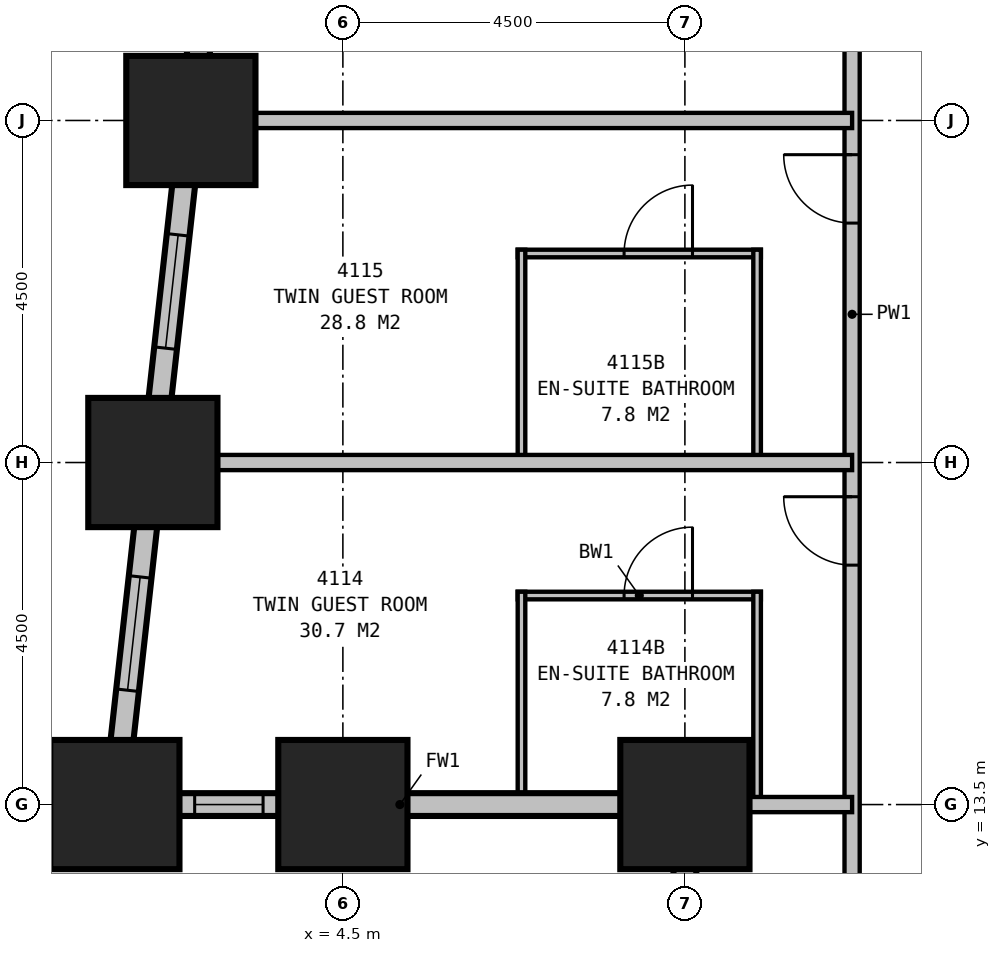
"""IFC4 building model, lengths in metres.
Left out: names, types, materials, properties, quantities, classifications, styles, units other than length and angle.
Written with IfcOpenShell. Run it as: python <this file> out.ifc"""

import sys

from ifc_helpers import new_model, si_unit, direction, frame, frame_2d, origin, origin_2d, place, context, subcontext, project, spatial, rectangle, extrude, element, fill, save


model = new_model("IFC4")
c1 = context("Model", 3, precision=1e-05, world=origin(), true_north=direction((0.0, 1.0)))
c2 = subcontext(c1, "Body", "Model", "MODEL_VIEW")
j1 = project(units=[si_unit("LENGTHUNIT", "METRE"), si_unit("PLANEANGLEUNIT", "RADIAN")], contexts=[c1])
p1 = place(None, origin())
s1 = spatial("IfcSite", under=j1, at=p1, CompositionType="ELEMENT")
p2 = place(p1, origin())
s2 = spatial("IfcBuilding", under=s1, at=p2, CompositionType="ELEMENT")
p3 = place(p2, frame((0.0, 0.0, 162.4)))
s3 = spatial("IfcBuildingStorey", under=s2, at=p3, CompositionType="ELEMENT", Elevation=162.4)
for number, where, z_axis, x_axis in (
    (1, (1.5, 13.5, 0.0), (0.0, 0.0, 1.0), (1.0, 0.0, 0.0)),
    (2, (4.5, 13.5, 0.0), (0.0, 0.0, 1.0), (1.0, 0.0, 0.0)),
    (3, (9.0, 13.5, 0.0), (0.0, 0.0, 1.0), (1.0, 0.0, 0.0)),
    (4, (2.5, 22.5, 0.0), (0.0, 0.0, 1.0), (1.0, 0.0, 0.0)),
    (5, (2.0, 18.0, 0.0), (0.0, 0.0, 1.0), (1.0, 0.0, 0.0)),
):
    element("IfcColumn", number, at=place(p3, frame(where, z_axis=z_axis, x_axis=x_axis)), inside=s3, PredefinedType="COLUMN", context=c2, shape_type="SweptSolid", body=[
        extrude(rectangle(XDim=1.7, YDim=1.7, at=origin_2d()), origin(), (0.0, 0.0, 1.0), 3.5),
    ])
p4 = place(p3, frame((1.35, 13.5, 0.0), z_axis=(0.0, 0.0, 1.0), x_axis=(1.0, 0.0, 0.0)))
e6 = element("IfcWall", 6, at=p4, inside=s3, PredefinedType="STANDARD", context=c2, shape_type="SweptSolid", body=[
    extrude(rectangle(XDim=7.8, YDim=0.3, at=frame_2d((3.9, 0.0))), origin(), (0.0, 0.0, 1.0), 2.0),
])
p5 = place(p4, frame((1.2, 0.0, 0.5)))
e7 = element("IfcOpeningElement", 7, at=p5, cuts=e6, PredefinedType="OPENING", context=c2, shape_type="SweptSolid", body=[
    extrude(rectangle(XDim=0.9, YDim=1.35, at=frame_2d((0.45, 0.675))), frame((0.0, 0.16, 0.0), z_axis=(0.0, -1.0, 0.0), x_axis=(1.0, 0.0, 0.0)), (0.0, 0.0, 1.0), 0.32),
])
p6 = place(p3, frame((9.0, 13.65, 0.0), z_axis=(0.0, 0.0, 1.0), x_axis=(0.0, -1.0, 0.0)))
e8 = element("IfcWall", 8, at=p6, inside=s3, PredefinedType="STANDARD", context=c2, shape_type="SweptSolid", body=[
    extrude(rectangle(XDim=13.8, YDim=0.3, at=frame_2d((6.9, 0.0))), origin(), (0.0, 0.0, 1.0), 2.0),
])
p7 = place(p6, frame((1.2, 0.0, 0.5)))
e9 = element("IfcOpeningElement", 9, at=p7, cuts=e8, PredefinedType="OPENING", context=c2, shape_type="SweptSolid", body=[
    extrude(rectangle(XDim=2.4, YDim=1.35, at=frame_2d((1.2, 0.675))), frame((0.0, 0.16, 0.0), z_axis=(0.0, -1.0, 0.0), x_axis=(1.0, 0.0, 0.0)), (0.0, 0.0, 1.0), 0.32),
])
p8 = place(p6, frame((5.7, 0.0, 0.5)))
e10 = element("IfcOpeningElement", 10, at=p8, cuts=e8, PredefinedType="OPENING", context=c2, shape_type="SweptSolid", body=[
    extrude(rectangle(XDim=2.4, YDim=1.35, at=frame_2d((1.2, 0.675))), frame((0.0, 0.16, 0.0), z_axis=(0.0, -1.0, 0.0), x_axis=(1.0, 0.0, 0.0)), (0.0, 0.0, 1.0), 0.32),
])
p9 = place(p6, frame((10.2, 0.0, 0.5)))
e11 = element("IfcOpeningElement", 11, at=p9, cuts=e8, PredefinedType="OPENING", context=c2, shape_type="SweptSolid", body=[
    extrude(rectangle(XDim=2.4, YDim=1.35, at=frame_2d((1.2, 0.675))), frame((0.0, 0.16, 0.0), z_axis=(0.0, -1.0, 0.0), x_axis=(1.0, 0.0, 0.0)), (0.0, 0.0, 1.0), 0.32),
])
p10 = place(p3, frame((4.017, 36.149, 0.0), z_axis=(0.0, 0.0, 1.0), x_axis=(-0.110433862387, -0.993883475081, 0.0)))
e12 = element("IfcWall", 12, at=p10, inside=s3, PredefinedType="STANDARD", context=c2, shape_type="SweptSolid", body=[
    extrude(rectangle(XDim=22.939, YDim=0.3, at=frame_2d((11.469, 0.0))), origin(), (0.0, 0.0, 1.0), 2.25),
])
p11 = place(p10, frame((1.664, 0.0, 0.5)))
e13 = element("IfcOpeningElement", 13, at=p11, cuts=e12, PredefinedType="OPENING", context=c2, shape_type="SweptSolid", body=[
    extrude(rectangle(XDim=1.5, YDim=1.6, at=frame_2d((0.75, 0.8))), frame((0.0, 0.16, 0.0), z_axis=(0.0, -1.0, 0.0), x_axis=(1.0, 0.0, 0.0)), (0.0, 0.0, 1.0), 0.32),
])
p12 = place(p10, frame((6.192, 0.0, 0.5)))
e14 = element("IfcOpeningElement", 14, at=p12, cuts=e12, PredefinedType="OPENING", context=c2, shape_type="SweptSolid", body=[
    extrude(rectangle(XDim=1.5, YDim=1.6, at=frame_2d((0.75, 0.8))), frame((0.0, 0.16, 0.0), z_axis=(0.0, -1.0, 0.0), x_axis=(1.0, 0.0, 0.0)), (0.0, 0.0, 1.0), 0.32),
])
p13 = place(p10, frame((10.719, 0.0, 0.5)))
e15 = element("IfcOpeningElement", 15, at=p13, cuts=e12, PredefinedType="OPENING", context=c2, shape_type="SweptSolid", body=[
    extrude(rectangle(XDim=1.5, YDim=1.6, at=frame_2d((0.75, 0.8))), frame((0.0, 0.16, 0.0), z_axis=(0.0, -1.0, 0.0), x_axis=(1.0, 0.0, 0.0)), (0.0, 0.0, 1.0), 0.32),
])
p14 = place(p10, frame((15.247, 0.0, 0.5)))
e16 = element("IfcOpeningElement", 16, at=p14, cuts=e12, PredefinedType="OPENING", context=c2, shape_type="SweptSolid", body=[
    extrude(rectangle(XDim=1.5, YDim=1.6, at=frame_2d((0.75, 0.8))), frame((0.0, 0.16, 0.0), z_axis=(0.0, -1.0, 0.0), x_axis=(1.0, 0.0, 0.0)), (0.0, 0.0, 1.0), 0.32),
])
p15 = place(p10, frame((19.775, 0.0, 0.5)))
e17 = element("IfcOpeningElement", 17, at=p15, cuts=e12, PredefinedType="OPENING", context=c2, shape_type="SweptSolid", body=[
    extrude(rectangle(XDim=1.5, YDim=1.6, at=frame_2d((0.75, 0.8))), frame((0.0, 0.16, 0.0), z_axis=(0.0, -1.0, 0.0), x_axis=(1.0, 0.0, 0.0)), (0.0, 0.0, 1.0), 0.32),
])
p16 = place(p3, frame((11.2, 10.6, 0.0), z_axis=(0.0, 0.0, 1.0), x_axis=(0.0, 1.0, 0.0)))
e18 = element("IfcWall", 18, at=p16, inside=s3, PredefinedType="PARTITIONING", context=c2, shape_type="SweptSolid", body=[
    extrude(rectangle(XDim=18.7, YDim=0.2, at=frame_2d((9.35, 0.0))), origin(), (0.0, 0.0, 1.0), 3.25),
])
p17 = place(p16, frame((6.05, 0.0, 0.0)))
e19 = element("IfcOpeningElement", 19, at=p17, cuts=e18, PredefinedType="OPENING", context=c2, shape_type="SweptSolid", body=[
    extrude(rectangle(XDim=0.9, YDim=2.1, at=frame_2d((0.45, 1.05))), frame((0.0, 0.11, 0.0), z_axis=(0.0, -1.0, 0.0), x_axis=(1.0, 0.0, 0.0)), (0.0, 0.0, 1.0), 0.22),
])
p18 = place(p16, frame((10.55, 0.0, 0.0)))
e20 = element("IfcOpeningElement", 20, at=p18, cuts=e18, PredefinedType="OPENING", context=c2, shape_type="SweptSolid", body=[
    extrude(rectangle(XDim=0.9, YDim=2.1, at=frame_2d((0.45, 1.05))), frame((0.0, 0.11, 0.0), z_axis=(0.0, -1.0, 0.0), x_axis=(1.0, 0.0, 0.0)), (0.0, 0.0, 1.0), 0.22),
])
p19 = place(p16, frame((14.65, 0.0, 0.0)))
e21 = element("IfcOpeningElement", 21, at=p19, cuts=e18, PredefinedType="OPENING", context=c2, shape_type="SweptSolid", body=[
    extrude(rectangle(XDim=1.0, YDim=2.1, at=frame_2d((0.5, 1.05))), frame((0.0, 0.11, 0.0), z_axis=(0.0, -1.0, 0.0), x_axis=(1.0, 0.0, 0.0)), (0.0, 0.0, 1.0), 0.22),
])
p20 = place(p3, frame((11.2, 18.0, 0.0), z_axis=(0.0, 0.0, 1.0), x_axis=(-1.0, 0.0, 0.0)))
e22 = element("IfcWall", 22, at=p20, inside=s3, PredefinedType="PARTITIONING", context=c2, shape_type="SweptSolid", body=[
    extrude(rectangle(XDim=9.199, YDim=0.2, at=frame_2d((4.6, 0.0))), origin(), (0.0, 0.0, 1.0), 2.25),
])
p21 = place(p3, frame((11.2, 22.5, 0.0), z_axis=(0.0, 0.0, 1.0), x_axis=(-1.0, 0.0, 0.0)))
e23 = element("IfcWall", 23, at=p21, inside=s3, PredefinedType="PARTITIONING", context=c2, shape_type="SweptSolid", body=[
    extrude(rectangle(XDim=8.699, YDim=0.2, at=frame_2d((4.35, 0.0))), origin(), (0.0, 0.0, 1.0), 2.25),
])
for number, where, z_axis, x_axis in (
    (24, (9.95, 13.5, 0.0), (0.0, 0.0, 1.0), (0.0, 1.0, 0.0)),
    (25, (6.85, 13.5, 0.0), (0.0, 0.0, 1.0), (0.0, 1.0, 0.0)),
):
    element("IfcWall", number, at=place(p3, frame(where, z_axis=z_axis, x_axis=x_axis)), inside=s3, PredefinedType="PLUMBINGWALL", context=c2, shape_type="SweptSolid", body=[
        extrude(rectangle(XDim=2.8, YDim=0.1, at=frame_2d((1.4, 0.0))), origin(), (0.0, 0.0, 1.0), 3.25),
    ])
p22 = place(p3, frame((10.0, 16.25, 0.0), z_axis=(0.0, 0.0, 1.0), x_axis=(-1.0, 0.0, 0.0)))
e26 = element("IfcWall", 26, at=p22, inside=s3, PredefinedType="PLUMBINGWALL", context=c2, shape_type="SweptSolid", body=[
    extrude(rectangle(XDim=3.2, YDim=0.1, at=frame_2d((1.6, 0.0))), origin(), (0.0, 0.0, 1.0), 3.25),
])
p23 = place(p22, frame((1.8, 0.0, 0.0), z_axis=(0.0, 0.0, 1.0), x_axis=(-1.0, 0.0, 0.0)))
e27 = element("IfcOpeningElement", 27, at=p23, cuts=e26, PredefinedType="OPENING", context=c2, shape_type="SweptSolid", body=[
    extrude(rectangle(XDim=0.9, YDim=2.1, at=frame_2d((0.45, 1.05))), frame((0.0, 0.06, 0.0), z_axis=(0.0, -1.0, 0.0), x_axis=(1.0, 0.0, 0.0)), (0.0, 0.0, 1.0), 0.12),
])
for number, where, z_axis, x_axis in (
    (28, (9.95, 18.0, 0.0), (0.0, 0.0, 1.0), (0.0, 1.0, 0.0)),
    (29, (6.85, 18.0, 0.0), (0.0, 0.0, 1.0), (0.0, 1.0, 0.0)),
):
    element("IfcWall", number, at=place(p3, frame(where, z_axis=z_axis, x_axis=x_axis)), inside=s3, PredefinedType="PLUMBINGWALL", context=c2, shape_type="SweptSolid", body=[
        extrude(rectangle(XDim=2.8, YDim=0.1, at=frame_2d((1.4, 0.0))), origin(), (0.0, 0.0, 1.0), 3.25),
    ])
p24 = place(p3, frame((10.0, 20.75, 0.0), z_axis=(0.0, 0.0, 1.0), x_axis=(-1.0, 0.0, 0.0)))
e30 = element("IfcWall", 30, at=p24, inside=s3, PredefinedType="PLUMBINGWALL", context=c2, shape_type="SweptSolid", body=[
    extrude(rectangle(XDim=3.2, YDim=0.1, at=frame_2d((1.6, 0.0))), origin(), (0.0, 0.0, 1.0), 3.25),
])
p25 = place(p24, frame((1.8, 0.0, 0.0), z_axis=(0.0, 0.0, 1.0), x_axis=(-1.0, 0.0, 0.0)))
e31 = element("IfcOpeningElement", 31, at=p25, cuts=e30, PredefinedType="OPENING", context=c2, shape_type="SweptSolid", body=[
    extrude(rectangle(XDim=0.9, YDim=2.1, at=frame_2d((0.45, 1.05))), frame((0.0, 0.06, 0.0), z_axis=(0.0, -1.0, 0.0), x_axis=(1.0, 0.0, 0.0)), (0.0, 0.0, 1.0), 0.12),
])
p26 = place(p3, frame((11.2, 13.5, 0.0), z_axis=(0.0, 0.0, 1.0), x_axis=(-1.0, 0.0, 0.0)))
e32 = element("IfcWall", 32, at=p26, inside=s3, PredefinedType="PARTITIONING", context=c2, shape_type="SweptSolid", body=[
    extrude(rectangle(XDim=2.2, YDim=0.2, at=frame_2d((1.1, 0.0))), origin(), (0.0, 0.0, 1.0), 1.95),
])
p27 = place(p5, origin())
e33 = element("IfcWindow", 33, at=p27, inside=s3, PartitioningType="SINGLE_PANEL", PredefinedType="WINDOW", context=c2, shape_type="SweptSolid", body=[
    extrude(rectangle(XDim=0.9, YDim=1.35, at=frame_2d((0.45, 0.675))), frame((0.0, 0.03, 0.0), z_axis=(0.0, -1.0, 0.0), x_axis=(1.0, 0.0, 0.0)), (0.0, 0.0, 1.0), 0.06),
])
fill(e7, e33)
p28 = place(p14, origin())
e34 = element("IfcWindow", 34, at=p28, inside=s3, PartitioningType="SINGLE_PANEL", PredefinedType="WINDOW", context=c2, shape_type="SweptSolid", body=[
    extrude(rectangle(XDim=1.5, YDim=1.6, at=frame_2d((0.75, 0.8))), frame((0.0, 0.03, 0.0), z_axis=(0.0, -1.0, 0.0), x_axis=(1.0, 0.0, 0.0)), (0.0, 0.0, 1.0), 0.06),
])
fill(e16, e34)
p29 = place(p15, origin())
e35 = element("IfcWindow", 35, at=p29, inside=s3, PartitioningType="SINGLE_PANEL", PredefinedType="WINDOW", context=c2, shape_type="SweptSolid", body=[
    extrude(rectangle(XDim=1.5, YDim=1.6, at=frame_2d((0.75, 0.8))), frame((0.0, 0.03, 0.0), z_axis=(0.0, -1.0, 0.0), x_axis=(1.0, 0.0, 0.0)), (0.0, 0.0, 1.0), 0.06),
])
fill(e17, e35)
p30 = place(p17, origin())
e36 = element("IfcDoor", 36, at=p30, inside=s3, OperationType="SINGLE_SWING_RIGHT", PredefinedType="DOOR", context=c2, shape_type="SweptSolid", body=[
    extrude(rectangle(XDim=0.9, YDim=2.1, at=frame_2d((0.45, 1.05))), frame((0.0, 0.025, 0.0), z_axis=(0.0, -1.0, 0.0), x_axis=(1.0, 0.0, 0.0)), (0.0, 0.0, 1.0), 0.05),
])
fill(e19, e36)
p31 = place(p18, origin())
e37 = element("IfcDoor", 37, at=p31, inside=s3, OperationType="SINGLE_SWING_RIGHT", PredefinedType="DOOR", context=c2, shape_type="SweptSolid", body=[
    extrude(rectangle(XDim=0.9, YDim=2.1, at=frame_2d((0.45, 1.05))), frame((0.0, 0.025, 0.0), z_axis=(0.0, -1.0, 0.0), x_axis=(1.0, 0.0, 0.0)), (0.0, 0.0, 1.0), 0.05),
])
fill(e20, e37)
p32 = place(p23, origin())
e38 = element("IfcDoor", 38, at=p32, inside=s3, OperationType="SINGLE_SWING_RIGHT", PredefinedType="DOOR", context=c2, shape_type="SweptSolid", body=[
    extrude(rectangle(XDim=0.9, YDim=2.1, at=frame_2d((0.45, 1.05))), frame((0.0, 0.025, 0.0), z_axis=(0.0, -1.0, 0.0), x_axis=(1.0, 0.0, 0.0)), (0.0, 0.0, 1.0), 0.05),
])
fill(e27, e38)
p33 = place(p25, origin())
e39 = element("IfcDoor", 39, at=p33, inside=s3, OperationType="SINGLE_SWING_RIGHT", PredefinedType="DOOR", context=c2, shape_type="SweptSolid", body=[
    extrude(rectangle(XDim=0.9, YDim=2.1, at=frame_2d((0.45, 1.05))), frame((0.0, 0.025, 0.0), z_axis=(0.0, -1.0, 0.0), x_axis=(1.0, 0.0, 0.0)), (0.0, 0.0, 1.0), 0.05),
])
fill(e31, e39)
save(model, sys.argv[1])
